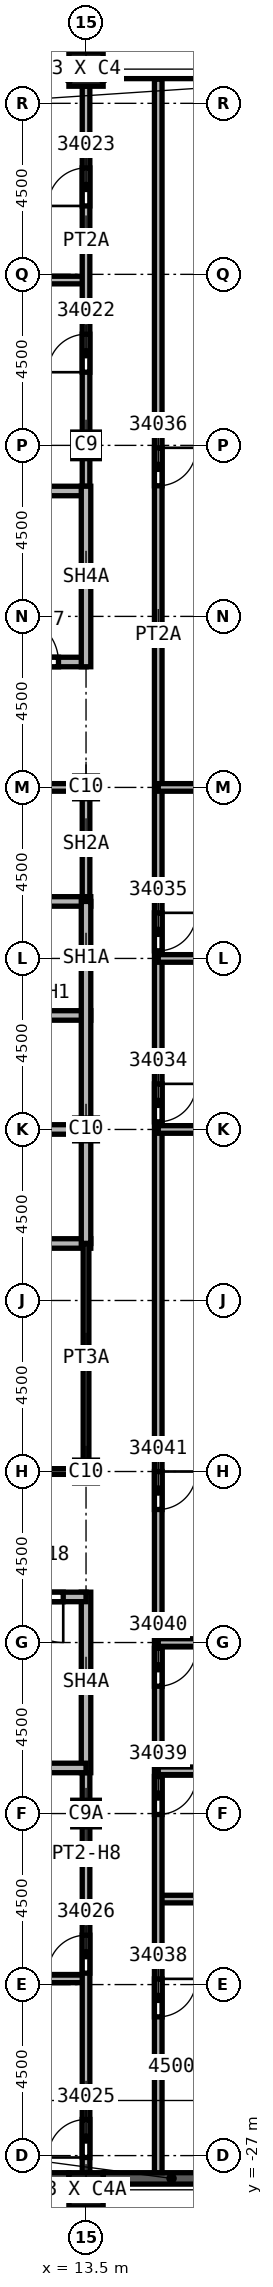
"""IFC4 building model, lengths in metres.
Left out: names, types, materials, properties, quantities, classifications, styles, units other than length and angle.
Written with IfcOpenShell. Run it as: python <this file> out.ifc"""

import sys

from ifc_helpers import new_model, si_unit, direction, frame, frame_2d, origin, origin_2d, place, context, subcontext, project, spatial, rectangle, extrude, element, fill, save


model = new_model("IFC4")
c1 = context("Model", 3, precision=1e-05, world=origin(), true_north=direction((0.0, 1.0)))
c2 = subcontext(c1, "Body", "Model", "MODEL_VIEW")
j1 = project(units=[si_unit("LENGTHUNIT", "METRE"), si_unit("PLANEANGLEUNIT", "RADIAN")], contexts=[c1])
p1 = place(None, origin())
s1 = spatial("IfcSite", under=j1, at=p1, CompositionType="ELEMENT")
p2 = place(p1, origin())
s2 = spatial("IfcBuilding", under=s1, at=p2, CompositionType="ELEMENT")
p3 = place(p2, frame((0.0, 0.0, 366.0)))
s3 = spatial("IfcBuildingStorey", under=s2, at=p3, CompositionType="ELEMENT", Elevation=366.0)
p4 = place(p3, frame((13.5, 18.0, 0.0), z_axis=(0.0, 0.0, 1.0), x_axis=(1.0, 0.0, 0.0)))
e1 = element("IfcColumn", 1, at=p4, inside=s3, PredefinedType="COLUMN", context=c2, shape_type="SweptSolid", body=[
    extrude(rectangle(XDim=0.7, YDim=0.7, at=origin_2d()), origin(), (0.0, 0.0, 1.0), 9.6),
])
p5 = place(p3, frame((13.5, -18.0, 0.0), z_axis=(0.0, 0.0, 1.0), x_axis=(1.0, 0.0, 0.0)))
e2 = element("IfcColumn", 2, at=p5, inside=s3, PredefinedType="COLUMN", context=c2, shape_type="SweptSolid", body=[
    extrude(rectangle(XDim=0.7, YDim=0.7, at=origin_2d()), origin(), (0.0, 0.0, 1.0), 9.532),
])
for number, where, z_axis, x_axis in (
    (3, (13.5, 0.0, 0.0), (0.0, 0.0, 1.0), (1.0, 0.0, 0.0)),
    (4, (13.5, 9.0, 0.0), (0.0, 0.0, 1.0), (1.0, 0.0, 0.0)),
    (5, (13.5, -9.0, 0.0), (0.0, 0.0, 1.0), (1.0, 0.0, 0.0)),
):
    element("IfcColumn", number, at=place(p3, frame(where, z_axis=z_axis, x_axis=x_axis)), inside=s3, PredefinedType="COLUMN", context=c2, shape_type="SweptSolid", body=[
        extrude(rectangle(XDim=0.6, YDim=0.6, at=origin_2d()), origin(), (0.0, 0.0, 1.0), 9.6),
    ])
p6 = place(p3, frame((13.5, 27.9, 0.0), z_axis=(0.0, 0.0, 1.0), x_axis=(1.0, 0.0, 0.0)))
e6 = element("IfcColumn", 6, at=p6, inside=s3, PredefinedType="COLUMN", context=c2, shape_type="SweptSolid", body=[
    extrude(rectangle(XDim=0.9, YDim=0.9, at=origin_2d()), origin(), (0.0, 0.0, 1.0), 9.6),
])
p7 = place(p3, frame((13.5, -27.9, 0.0), z_axis=(0.0, 0.0, 1.0), x_axis=(1.0, 0.0, 0.0)))
e7 = element("IfcColumn", 7, at=p7, inside=s3, PredefinedType="COLUMN", context=c2, shape_type="SweptSolid", body=[
    extrude(rectangle(XDim=0.9, YDim=0.9, at=origin_2d()), origin(), (0.0, 0.0, 1.0), 4.919),
])
for number, where, z_axis, x_axis in (
    (8, (9.45, -27.6, 0.0), (0.0, 0.0, 1.0), (1.0, 0.0, 0.0)),
    (9, (13.95, -27.6, 0.0), (0.0, 0.0, 1.0), (1.0, 0.0, 0.0)),
):
    element("IfcWall", number, at=place(p3, frame(where, z_axis=z_axis, x_axis=x_axis)), inside=s3, PredefinedType="SOLIDWALL", context=c2, shape_type="SweptSolid", body=[
        extrude(rectangle(XDim=3.6, YDim=0.3, at=frame_2d((1.8, 0.0))), origin(), (0.0, 0.0, 1.0), 5.4),
    ])
p8 = place(p3, frame((3.0, -22.35, 0.0), z_axis=(0.0, 0.0, 1.0), x_axis=(1.0, 0.0, 0.0)))
e10 = element("IfcWall", 10, at=p8, inside=s3, PredefinedType="PARTITIONING", context=c2, shape_type="SweptSolid", body=[
    extrude(rectangle(XDim=10.5, YDim=0.2, at=frame_2d((5.25, 0.0))), origin(), (0.0, 0.0, 1.0), 5.76),
])
p9 = place(p3, frame((3.0, 22.35, 0.0), z_axis=(0.0, 0.0, 1.0), x_axis=(1.0, 0.0, 0.0)))
e11 = element("IfcWall", 11, at=p9, inside=s3, PredefinedType="PARTITIONING", context=c2, shape_type="SweptSolid", body=[
    extrude(rectangle(XDim=10.5, YDim=0.2, at=frame_2d((5.25, 0.0))), origin(), (0.0, 0.0, 1.0), 9.15),
])
p10 = place(p3, frame((13.5, -27.45, 0.0), z_axis=(0.0, 0.0, 1.0), x_axis=(0.0, 1.0, 0.0)))
e12 = element("IfcWall", 12, at=p10, inside=s3, PredefinedType="PARTITIONING", context=c2, shape_type="SweptSolid", body=[
    extrude(rectangle(XDim=10.775, YDim=0.2, at=frame_2d((5.387, 0.0))), origin(), (0.0, 0.0, 1.0), 4.916),
])
p11 = place(p10, frame((0.4, 0.0, 0.0)))
e13 = element("IfcOpeningElement", 13, at=p11, cuts=e12, PredefinedType="OPENING", context=c2, shape_type="SweptSolid", body=[
    extrude(rectangle(XDim=1.0, YDim=2.1, at=frame_2d((0.5, 1.05))), frame((0.0, 0.1, 0.0), z_axis=(0.0, -1.0, 0.0), x_axis=(1.0, 0.0, 0.0)), (0.0, 0.0, 1.0), 0.2),
])
p12 = place(p10, frame((5.25, 0.0, 0.0)))
e14 = element("IfcOpeningElement", 14, at=p12, cuts=e12, PredefinedType="OPENING", context=c2, shape_type="SweptSolid", body=[
    extrude(rectangle(XDim=1.0, YDim=2.1, at=frame_2d((0.5, 1.05))), frame((0.0, 0.1, 0.0), z_axis=(0.0, -1.0, 0.0), x_axis=(1.0, 0.0, 0.0)), (0.0, 0.0, 1.0), 0.2),
])
p13 = place(p3, frame((13.5, 16.675, 0.0), z_axis=(0.0, 0.0, 1.0), x_axis=(0.0, 1.0, 0.0)))
e15 = element("IfcWall", 15, at=p13, inside=s3, PredefinedType="PARTITIONING", context=c2, shape_type="SweptSolid", body=[
    extrude(rectangle(XDim=10.775, YDim=0.2, at=frame_2d((5.387, 0.0))), origin(), (0.0, 0.0, 1.0), 5.76),
])
p14 = place(p13, frame((3.25, 0.0, 0.0)))
e16 = element("IfcOpeningElement", 16, at=p14, cuts=e15, PredefinedType="OPENING", context=c2, shape_type="SweptSolid", body=[
    extrude(rectangle(XDim=1.0, YDim=2.1, at=frame_2d((0.5, 1.05))), frame((0.0, 0.1, 0.0), z_axis=(0.0, -1.0, 0.0), x_axis=(1.0, 0.0, 0.0)), (0.0, 0.0, 1.0), 0.2),
])
p15 = place(p13, frame((7.625, 0.0, 0.0)))
e17 = element("IfcOpeningElement", 17, at=p15, cuts=e15, PredefinedType="OPENING", context=c2, shape_type="SweptSolid", body=[
    extrude(rectangle(XDim=1.0, YDim=2.1, at=frame_2d((0.5, 1.05))), frame((0.0, 0.1, 0.0), z_axis=(0.0, -1.0, 0.0), x_axis=(1.0, 0.0, 0.0)), (0.0, 0.0, 1.0), 0.2),
])
p16 = place(p3, frame((15.4, -20.25, 0.0), z_axis=(0.0, 0.0, 1.0), x_axis=(1.0, 0.0, 0.0)))
e18 = element("IfcWall", 18, at=p16, inside=s3, PredefinedType="PARTITIONING", context=c2, shape_type="SweptSolid", body=[
    extrude(rectangle(XDim=9.086, YDim=0.2, at=frame_2d((4.543, 0.0))), origin(), (0.0, 0.0, 1.0), 5.76),
])
p17 = place(p3, frame((15.4, 27.636, 0.0), z_axis=(0.0, 0.0, 1.0), x_axis=(0.0, -1.0, 0.0)))
e19 = element("IfcWall", 19, at=p17, inside=s3, PredefinedType="PARTITIONING", context=c2, shape_type="SweptSolid", body=[
    extrude(rectangle(XDim=55.086, YDim=0.2, at=frame_2d((27.543, 0.0))), origin(), (0.0, 0.0, 1.0), 5.76),
])
p18 = place(p17, frame((26.436, 0.0, 0.0)))
e20 = element("IfcOpeningElement", 20, at=p18, cuts=e19, PredefinedType="OPENING", context=c2, shape_type="SweptSolid", body=[
    extrude(rectangle(XDim=1.0, YDim=2.1, at=frame_2d((0.5, 1.05))), frame((0.0, 0.1, 0.0), z_axis=(0.0, -1.0, 0.0), x_axis=(1.0, 0.0, 0.0)), (0.0, 0.0, 1.0), 0.2),
])
p19 = place(p17, frame((21.936, 0.0, 0.0)))
e21 = element("IfcOpeningElement", 21, at=p19, cuts=e19, PredefinedType="OPENING", context=c2, shape_type="SweptSolid", body=[
    extrude(rectangle(XDim=1.0, YDim=2.1, at=frame_2d((0.5, 1.05))), frame((0.0, 0.1, 0.0), z_axis=(0.0, -1.0, 0.0), x_axis=(1.0, 0.0, 0.0)), (0.0, 0.0, 1.0), 0.2),
])
p20 = place(p17, frame((9.7, 0.0, 0.0)))
e22 = element("IfcOpeningElement", 22, at=p20, cuts=e19, PredefinedType="OPENING", context=c2, shape_type="SweptSolid", body=[
    extrude(rectangle(XDim=1.0, YDim=2.1, at=frame_2d((0.5, 1.05))), frame((0.0, 0.1, 0.0), z_axis=(0.0, -1.0, 0.0), x_axis=(1.0, 0.0, 0.0)), (0.0, 0.0, 1.0), 0.2),
])
p21 = place(p17, frame((49.986, 0.0, 0.0)))
e23 = element("IfcOpeningElement", 23, at=p21, cuts=e19, PredefinedType="OPENING", context=c2, shape_type="SweptSolid", body=[
    extrude(rectangle(XDim=1.0, YDim=2.1, at=frame_2d((0.5, 1.05))), frame((0.0, 0.1, 0.0), z_axis=(0.0, -1.0, 0.0), x_axis=(1.0, 0.0, 0.0)), (0.0, 0.0, 1.0), 0.2),
])
p22 = place(p17, frame((44.661, 0.0, 0.0)))
e24 = element("IfcOpeningElement", 24, at=p22, cuts=e19, PredefinedType="OPENING", context=c2, shape_type="SweptSolid", body=[
    extrude(rectangle(XDim=1.0, YDim=2.1, at=frame_2d((0.5, 1.05))), frame((0.0, 0.1, 0.0), z_axis=(0.0, -1.0, 0.0), x_axis=(1.0, 0.0, 0.0)), (0.0, 0.0, 1.0), 0.2),
])
p23 = place(p17, frame((41.286, 0.0, 0.0)))
e25 = element("IfcOpeningElement", 25, at=p23, cuts=e19, PredefinedType="OPENING", context=c2, shape_type="SweptSolid", body=[
    extrude(rectangle(XDim=1.0, YDim=2.1, at=frame_2d((0.5, 1.05))), frame((0.0, 0.1, 0.0), z_axis=(0.0, -1.0, 0.0), x_axis=(1.0, 0.0, 0.0)), (0.0, 0.0, 1.0), 0.2),
])
p24 = place(p17, frame((36.636, 0.0, 0.0)))
e26 = element("IfcOpeningElement", 26, at=p24, cuts=e19, PredefinedType="OPENING", context=c2, shape_type="SweptSolid", body=[
    extrude(rectangle(XDim=1.0, YDim=2.1, at=frame_2d((0.5, 1.05))), frame((0.0, 0.1, 0.0), z_axis=(0.0, -1.0, 0.0), x_axis=(1.0, 0.0, 0.0)), (0.0, 0.0, 1.0), 0.2),
])
p25 = place(p3, frame((15.4, -16.875, 0.0), z_axis=(0.0, 0.0, 1.0), x_axis=(1.0, 0.0, 0.0)))
e27 = element("IfcWall", 27, at=p25, inside=s3, PredefinedType="PARTITIONING", context=c2, shape_type="SweptSolid", body=[
    extrude(rectangle(XDim=11.336, YDim=0.2, at=frame_2d((5.668, 0.0))), origin(), (0.0, 0.0, 1.0), 9.115),
])
for number, where, z_axis, x_axis in (
    (28, (15.4, -13.5, 0.0), (0.0, 0.0, 1.0), (1.0, 0.0, 0.0)),
    (29, (15.4, 4.5, 0.0), (0.0, 0.0, 1.0), (1.0, 0.0, 0.0)),
    (30, (15.4, 9.0, 0.0), (0.0, 0.0, 1.0), (1.0, 0.0, 0.0)),
    (31, (26.55, 0.0, 0.0), (0.0, 0.0, 1.0), (-1.0, 0.0, 0.0)),
):
    element("IfcWall", number, at=place(p3, frame(where, z_axis=z_axis, x_axis=x_axis)), inside=s3, PredefinedType="PARTITIONING", context=c2, shape_type="SweptSolid", body=[
        extrude(rectangle(XDim=11.15, YDim=0.2, at=frame_2d((5.575, 0.0))), origin(), (0.0, 0.0, 1.0), 9.15),
    ])
p26 = place(p3, frame((10.5, 9.0, 0.0), z_axis=(0.0, 0.0, 1.0), x_axis=(1.0, 0.0, 0.0)))
e32 = element("IfcWall", 32, at=p26, inside=s3, PredefinedType="SOLIDWALL", context=c2, shape_type="SweptSolid", body=[
    extrude(rectangle(XDim=3.0, YDim=0.2, at=frame_2d((1.5, 0.0))), origin(), (0.0, 0.0, 1.0), 8.838),
])
p27 = place(p3, frame((13.5, 9.1, 0.0), z_axis=(0.0, 0.0, 1.0), x_axis=(0.0, -1.0, 0.0)))
e33 = element("IfcWall", 33, at=p27, inside=s3, PredefinedType="SOLIDWALL", context=c2, shape_type="SweptSolid", body=[
    extrude(rectangle(XDim=3.1, YDim=0.2, at=frame_2d((1.55, 0.0))), origin(), (0.0, 0.0, 1.0), 5.76),
])
p28 = place(p3, frame((7.5, -3.0, 0.0), z_axis=(0.0, 0.0, 1.0), x_axis=(1.0, 0.0, 0.0)))
e34 = element("IfcWall", 34, at=p28, inside=s3, PredefinedType="SOLIDWALL", context=c2, shape_type="SweptSolid", body=[
    extrude(rectangle(XDim=6.125, YDim=0.25, at=frame_2d((3.062, 0.0))), origin(), (0.0, 0.0, 1.0), 9.15),
])
p29 = place(p28, frame((0.25, 0.0, 0.0)))
e35 = element("IfcOpeningElement", 35, at=p29, cuts=e34, PredefinedType="OPENING", context=c2, shape_type="SweptSolid", body=[
    extrude(rectangle(XDim=1.1, YDim=2.1, at=frame_2d((0.55, 1.05))), frame((0.0, 0.125, 0.0), z_axis=(0.0, -1.0, 0.0), x_axis=(1.0, 0.0, 0.0)), (0.0, 0.0, 1.0), 0.25),
])
p30 = place(p3, frame((7.5, 3.0, 0.0), z_axis=(0.0, 0.0, 1.0), x_axis=(1.0, 0.0, 0.0)))
e36 = element("IfcWall", 36, at=p30, inside=s3, PredefinedType="SOLIDWALL", context=c2, shape_type="SweptSolid", body=[
    extrude(rectangle(XDim=6.125, YDim=0.25, at=frame_2d((3.062, 0.0))), origin(), (0.0, 0.0, 1.0), 9.15),
])
p31 = place(p30, frame((0.25, 0.0, 0.0)))
e37 = element("IfcOpeningElement", 37, at=p31, cuts=e36, PredefinedType="OPENING", context=c2, shape_type="SweptSolid", body=[
    extrude(rectangle(XDim=1.1, YDim=2.1, at=frame_2d((0.55, 1.05))), frame((0.0, 0.125, 0.0), z_axis=(0.0, -1.0, 0.0), x_axis=(1.0, 0.0, 0.0)), (0.0, 0.0, 1.0), 0.25),
])
for number, where, z_axis, x_axis in (
    (38, (10.5, 0.0, 0.0), (0.0, 0.0, 1.0), (1.0, 0.0, 0.0)),
    (39, (10.5, 6.0, 0.0), (0.0, 0.0, 1.0), (1.0, 0.0, 0.0)),
):
    element("IfcWall", number, at=place(p3, frame(where, z_axis=z_axis, x_axis=x_axis)), inside=s3, PredefinedType="SOLIDWALL", context=c2, shape_type="SweptSolid", body=[
        extrude(rectangle(XDim=3.125, YDim=0.25, at=frame_2d((1.562, 0.0))), origin(), (0.0, 0.0, 1.0), 9.15),
    ])
p32 = place(p3, frame((13.5, 6.0, 0.0), z_axis=(0.0, 0.0, 1.0), x_axis=(0.0, -1.0, 0.0)))
e40 = element("IfcWall", 40, at=p32, inside=s3, PredefinedType="SOLIDWALL", context=c2, shape_type="SweptSolid", body=[
    extrude(rectangle(XDim=9.0, YDim=0.25, at=frame_2d((4.5, 0.0))), origin(), (0.0, 0.0, 1.0), 5.76),
])
p33 = place(p3, frame((4.375, 12.3, 0.0), z_axis=(0.0, 0.0, 1.0), x_axis=(1.0, 0.0, 0.0)))
e41 = element("IfcWall", 41, at=p33, inside=s3, PredefinedType="SOLIDWALL", context=c2, shape_type="SweptSolid", body=[
    extrude(rectangle(XDim=9.125, YDim=0.25, at=frame_2d((4.562, 0.0))), origin(), (0.0, 0.0, 1.0), 9.15),
])
p34 = place(p33, frame((7.2, 0.0, 0.0)))
e42 = element("IfcOpeningElement", 42, at=p34, cuts=e41, PredefinedType="OPENING", context=c2, shape_type="SweptSolid", body=[
    extrude(rectangle(XDim=1.2, YDim=2.1, at=frame_2d((0.6, 1.05))), frame((0.0, 0.125, 0.0), z_axis=(0.0, -1.0, 0.0), x_axis=(1.0, 0.0, 0.0)), (0.0, 0.0, 1.0), 0.25),
])
p35 = place(p3, frame((4.4, 16.8, 0.0), z_axis=(0.0, 0.0, 1.0), x_axis=(1.0, 0.0, 0.0)))
e43 = element("IfcWall", 43, at=p35, inside=s3, PredefinedType="SOLIDWALL", context=c2, shape_type="SweptSolid", body=[
    extrude(rectangle(XDim=9.1, YDim=0.25, at=frame_2d((4.55, 0.0))), origin(), (0.0, 0.0, 1.0), 9.15),
])
p36 = place(p3, frame((13.5, -16.925, 0.0), z_axis=(0.0, 0.0, 1.0), x_axis=(0.0, 1.0, 0.0)))
e44 = element("IfcWall", 44, at=p36, inside=s3, PredefinedType="SOLIDWALL", context=c2, shape_type="SweptSolid", body=[
    extrude(rectangle(XDim=4.75, YDim=0.25, at=frame_2d((2.375, 0.0))), origin(), (0.0, 0.0, 1.0), 5.76),
])
p37 = place(p3, frame((13.5, -16.8, 0.0), z_axis=(0.0, 0.0, 1.0), x_axis=(-1.0, 0.0, 0.0)))
e45 = element("IfcWall", 45, at=p37, inside=s3, PredefinedType="SOLIDWALL", context=c2, shape_type="SweptSolid", body=[
    extrude(rectangle(XDim=9.1, YDim=0.25, at=frame_2d((4.55, 0.0))), origin(), (0.0, 0.0, 1.0), 8.136),
])
p38 = place(p3, frame((13.5, -12.3, 0.0), z_axis=(0.0, 0.0, 1.0), x_axis=(-1.0, 0.0, 0.0)))
e46 = element("IfcWall", 46, at=p38, inside=s3, PredefinedType="SOLIDWALL", context=c2, shape_type="SweptSolid", body=[
    extrude(rectangle(XDim=9.125, YDim=0.25, at=frame_2d((4.562, 0.0))), origin(), (0.0, 0.0, 1.0), 9.15),
])
p39 = place(p38, frame((0.6, 0.0, 0.0)))
e47 = element("IfcOpeningElement", 47, at=p39, cuts=e46, PredefinedType="OPENING", context=c2, shape_type="SweptSolid", body=[
    extrude(rectangle(XDim=1.2, YDim=2.1, at=frame_2d((0.6, 1.05))), frame((0.0, 0.125, 0.0), z_axis=(0.0, -1.0, 0.0), x_axis=(1.0, 0.0, 0.0)), (0.0, 0.0, 1.0), 0.25),
])
p40 = place(p3, frame((13.5, 12.175, 0.0), z_axis=(0.0, 0.0, 1.0), x_axis=(0.0, 1.0, 0.0)))
e48 = element("IfcWall", 48, at=p40, inside=s3, PredefinedType="SOLIDWALL", context=c2, shape_type="SweptSolid", body=[
    extrude(rectangle(XDim=4.75, YDim=0.25, at=frame_2d((2.375, 0.0))), origin(), (0.0, 0.0, 1.0), 5.76),
])
p41 = place(p3, frame((13.5, -9.0, 0.0), z_axis=(0.0, 0.0, 1.0), x_axis=(-1.0, 0.0, 0.0)))
e49 = element("IfcWall", 49, at=p41, inside=s3, PredefinedType="PARTITIONING", context=c2, shape_type="SweptSolid", body=[
    extrude(rectangle(XDim=3.0, YDim=0.15, at=frame_2d((1.5, 0.0))), origin(), (0.0, 0.0, 1.0), 8.754),
])
p42 = place(p3, frame((13.5, -3.0, 0.0), z_axis=(0.0, 0.0, 1.0), x_axis=(0.0, -1.0, 0.0)))
e50 = element("IfcWall", 50, at=p42, inside=s3, PredefinedType="PARTITIONING", context=c2, shape_type="SweptSolid", body=[
    extrude(rectangle(XDim=6.075, YDim=0.15, at=frame_2d((3.038, 0.0))), origin(), (0.0, 0.0, 1.0), 5.76),
])
p43 = place(p34, origin())
e51 = element("IfcDoor", 51, at=p43, inside=s3, OperationType="SINGLE_SWING_RIGHT", PredefinedType="DOOR", context=c2, shape_type="SweptSolid", body=[
    extrude(rectangle(XDim=1.2, YDim=2.1, at=frame_2d((0.6, 1.05))), frame((0.0, 0.025, 0.0), z_axis=(0.0, -1.0, 0.0), x_axis=(1.0, 0.0, 0.0)), (0.0, 0.0, 1.0), 0.05),
])
fill(e42, e51)
p44 = place(p39, origin())
e52 = element("IfcDoor", 52, at=p44, inside=s3, OperationType="SINGLE_SWING_LEFT", PredefinedType="DOOR", context=c2, shape_type="SweptSolid", body=[
    extrude(rectangle(XDim=1.2, YDim=2.1, at=frame_2d((0.6, 1.05))), frame((0.0, 0.025, 0.0), z_axis=(0.0, -1.0, 0.0), x_axis=(1.0, 0.0, 0.0)), (0.0, 0.0, 1.0), 0.05),
])
fill(e47, e52)
p45 = place(p14, origin())
e53 = element("IfcDoor", 53, at=p45, inside=s3, OperationType="SINGLE_SWING_LEFT", PredefinedType="DOOR", context=c2, shape_type="SweptSolid", body=[
    extrude(rectangle(XDim=1.0, YDim=2.1, at=frame_2d((0.5, 1.05))), frame((0.0, 0.025, 0.0), z_axis=(0.0, -1.0, 0.0), x_axis=(1.0, 0.0, 0.0)), (0.0, 0.0, 1.0), 0.05),
])
fill(e16, e53)
p46 = place(p15, origin())
e54 = element("IfcDoor", 54, at=p46, inside=s3, OperationType="SINGLE_SWING_RIGHT", PredefinedType="DOOR", context=c2, shape_type="SweptSolid", body=[
    extrude(rectangle(XDim=1.0, YDim=2.1, at=frame_2d((0.5, 1.05))), frame((0.0, 0.025, 0.0), z_axis=(0.0, -1.0, 0.0), x_axis=(1.0, 0.0, 0.0)), (0.0, 0.0, 1.0), 0.05),
])
fill(e17, e54)
p47 = place(p11, origin())
e55 = element("IfcDoor", 55, at=p47, inside=s3, OperationType="SINGLE_SWING_RIGHT", PredefinedType="DOOR", context=c2, shape_type="SweptSolid", body=[
    extrude(rectangle(XDim=1.0, YDim=2.1, at=frame_2d((0.5, 1.05))), frame((0.0, 0.025, 0.0), z_axis=(0.0, -1.0, 0.0), x_axis=(1.0, 0.0, 0.0)), (0.0, 0.0, 1.0), 0.05),
])
fill(e13, e55)
p48 = place(p12, origin())
e56 = element("IfcDoor", 56, at=p48, inside=s3, OperationType="SINGLE_SWING_LEFT", PredefinedType="DOOR", context=c2, shape_type="SweptSolid", body=[
    extrude(rectangle(XDim=1.0, YDim=2.1, at=frame_2d((0.5, 1.05))), frame((0.0, 0.025, 0.0), z_axis=(0.0, -1.0, 0.0), x_axis=(1.0, 0.0, 0.0)), (0.0, 0.0, 1.0), 0.05),
])
fill(e14, e56)
p49 = place(p18, origin())
e57 = element("IfcDoor", 57, at=p49, inside=s3, OperationType="SINGLE_SWING_LEFT", PredefinedType="DOOR", context=c2, shape_type="SweptSolid", body=[
    extrude(rectangle(XDim=1.0, YDim=2.1, at=frame_2d((0.5, 1.05))), frame((0.0, 0.025, 0.0), z_axis=(0.0, -1.0, 0.0), x_axis=(1.0, 0.0, 0.0)), (0.0, 0.0, 1.0), 0.05),
])
fill(e20, e57)
p50 = place(p19, origin())
e58 = element("IfcDoor", 58, at=p50, inside=s3, OperationType="SINGLE_SWING_RIGHT", PredefinedType="DOOR", context=c2, shape_type="SweptSolid", body=[
    extrude(rectangle(XDim=1.0, YDim=2.1, at=frame_2d((0.5, 1.05))), frame((0.0, 0.025, 0.0), z_axis=(0.0, -1.0, 0.0), x_axis=(1.0, 0.0, 0.0)), (0.0, 0.0, 1.0), 0.05),
])
fill(e21, e58)
p51 = place(p20, origin())
e59 = element("IfcDoor", 59, at=p51, inside=s3, OperationType="SINGLE_SWING_LEFT", PredefinedType="DOOR", context=c2, shape_type="SweptSolid", body=[
    extrude(rectangle(XDim=1.0, YDim=2.1, at=frame_2d((0.5, 1.05))), frame((0.0, 0.025, 0.0), z_axis=(0.0, -1.0, 0.0), x_axis=(1.0, 0.0, 0.0)), (0.0, 0.0, 1.0), 0.05),
])
fill(e22, e59)
p52 = place(p21, origin())
e60 = element("IfcDoor", 60, at=p52, inside=s3, OperationType="SINGLE_SWING_LEFT", PredefinedType="DOOR", context=c2, shape_type="SweptSolid", body=[
    extrude(rectangle(XDim=1.0, YDim=2.1, at=frame_2d((0.5, 1.05))), frame((0.0, 0.025, 0.0), z_axis=(0.0, -1.0, 0.0), x_axis=(1.0, 0.0, 0.0)), (0.0, 0.0, 1.0), 0.05),
])
fill(e23, e60)
p53 = place(p22, origin())
e61 = element("IfcDoor", 61, at=p53, inside=s3, OperationType="SINGLE_SWING_RIGHT", PredefinedType="DOOR", context=c2, shape_type="SweptSolid", body=[
    extrude(rectangle(XDim=1.0, YDim=2.1, at=frame_2d((0.5, 1.05))), frame((0.0, 0.025, 0.0), z_axis=(0.0, -1.0, 0.0), x_axis=(1.0, 0.0, 0.0)), (0.0, 0.0, 1.0), 0.05),
])
fill(e24, e61)
p54 = place(p23, origin())
e62 = element("IfcDoor", 62, at=p54, inside=s3, OperationType="SINGLE_SWING_LEFT", PredefinedType="DOOR", context=c2, shape_type="SweptSolid", body=[
    extrude(rectangle(XDim=1.0, YDim=2.1, at=frame_2d((0.5, 1.05))), frame((0.0, 0.025, 0.0), z_axis=(0.0, -1.0, 0.0), x_axis=(1.0, 0.0, 0.0)), (0.0, 0.0, 1.0), 0.05),
])
fill(e25, e62)
p55 = place(p24, origin())
e63 = element("IfcDoor", 63, at=p55, inside=s3, OperationType="SINGLE_SWING_RIGHT", PredefinedType="DOOR", context=c2, shape_type="SweptSolid", body=[
    extrude(rectangle(XDim=1.0, YDim=2.1, at=frame_2d((0.5, 1.05))), frame((0.0, 0.025, 0.0), z_axis=(0.0, -1.0, 0.0), x_axis=(1.0, 0.0, 0.0)), (0.0, 0.0, 1.0), 0.05),
])
fill(e26, e63)
save(model, sys.argv[1])
